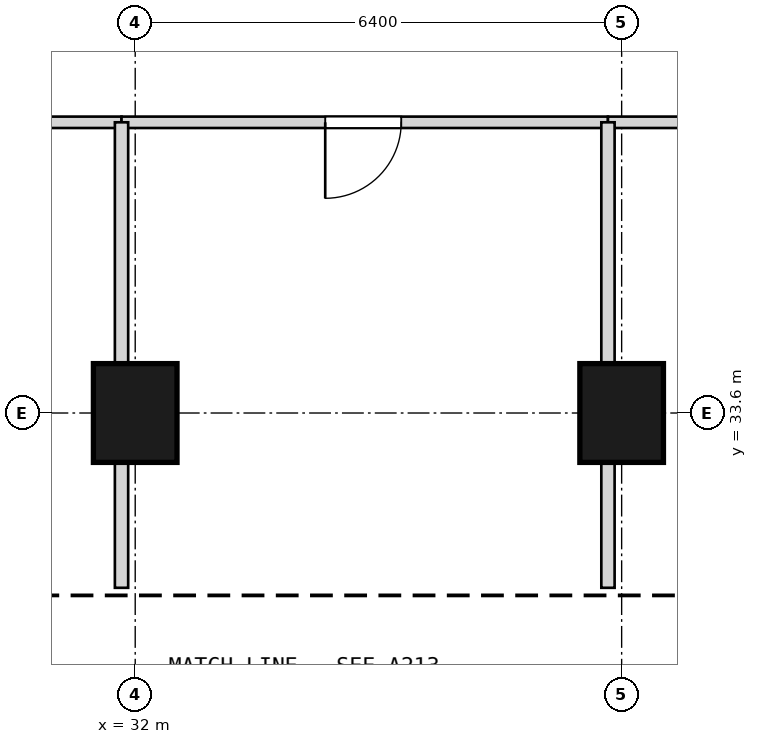
"""IFC4 building model, lengths in metres.
Left out: names, types, materials, properties, quantities, classifications, styles, units other than length and angle.
Written with IfcOpenShell. Run it as: python <this file> out.ifc"""

import sys

from ifc_helpers import new_model, si_unit, direction, frame, frame_2d, origin, origin_2d, place, context, subcontext, project, spatial, rectangle, extrude, element, fill, save


model = new_model("IFC4")
c1 = context("Model", 3, precision=1e-05, world=origin(), true_north=direction((0.0, 1.0)))
c2 = subcontext(c1, "Body", "Model", "MODEL_VIEW")
j1 = project(units=[si_unit("LENGTHUNIT", "METRE"), si_unit("PLANEANGLEUNIT", "RADIAN")], contexts=[c1])
p1 = place(None, origin())
s1 = spatial("IfcSite", under=j1, at=p1, CompositionType="ELEMENT")
p2 = place(p1, origin())
s2 = spatial("IfcBuilding", under=s1, at=p2, CompositionType="ELEMENT")
p3 = place(p2, frame((0.0, 0.0, 8.4)))
s3 = spatial("IfcBuildingStorey", under=s2, at=p3, CompositionType="ELEMENT", Elevation=8.4)
for number, where, z_axis, x_axis in (
    (1, (32.0, 33.6, 0.0), (0.0, 0.0, 1.0), (1.0, 0.0, 0.0)),
    (2, (38.4, 33.6, 0.0), (0.0, 0.0, 1.0), (1.0, 0.0, 0.0)),
):
    element("IfcColumn", number, at=place(p3, frame(where, z_axis=z_axis, x_axis=x_axis)), inside=s3, PredefinedType="COLUMN", context=c2, shape_type="SweptSolid", body=[
        extrude(rectangle(XDim=1.1, YDim=1.3, at=origin_2d()), origin(), (0.0, 0.0, 1.0), 4.5),
    ])
p4 = place(p3, frame((25.85, 37.425, 0.0), z_axis=(0.0, 0.0, 1.0), x_axis=(1.0, 0.0, 0.0)))
e3 = element("IfcWall", 3, at=p4, inside=s3, PredefinedType="PARTITIONING", context=c2, shape_type="SweptSolid", body=[
    extrude(rectangle(XDim=5.97, YDim=0.15, at=frame_2d((2.985, 0.0))), origin(), (0.0, 0.0, 1.0), 4.28),
])
p5 = place(p4, frame((2.45, 0.0, 0.0)))
e4 = element("IfcOpeningElement", 4, at=p5, cuts=e3, PredefinedType="OPENING", context=c2, shape_type="SweptSolid", body=[
    extrude(rectangle(XDim=1.0, YDim=2.1, at=frame_2d((0.5, 1.05))), frame((0.0, 0.085, 0.0), z_axis=(0.0, -1.0, 0.0), x_axis=(1.0, 0.0, 0.0)), (0.0, 0.0, 1.0), 0.17),
])
p6 = place(p3, frame((31.82, 37.425, 0.0), z_axis=(0.0, 0.0, 1.0), x_axis=(1.0, 0.0, 0.0)))
e5 = element("IfcWall", 5, at=p6, inside=s3, PredefinedType="PARTITIONING", context=c2, shape_type="SweptSolid", body=[
    extrude(rectangle(XDim=6.4, YDim=0.15, at=frame_2d((3.2, 0.0))), origin(), (0.0, 0.0, 1.0), 4.28),
])
p7 = place(p6, frame((2.68, 0.0, 0.0)))
e6 = element("IfcOpeningElement", 6, at=p7, cuts=e5, PredefinedType="OPENING", context=c2, shape_type="SweptSolid", body=[
    extrude(rectangle(XDim=1.0, YDim=2.1, at=frame_2d((0.5, 1.05))), frame((0.0, 0.085, 0.0), z_axis=(0.0, -1.0, 0.0), x_axis=(1.0, 0.0, 0.0)), (0.0, 0.0, 1.0), 0.17),
])
p8 = place(p3, frame((38.22, 37.425, 0.0), z_axis=(0.0, 0.0, 1.0), x_axis=(1.0, 0.0, 0.0)))
e7 = element("IfcWall", 7, at=p8, inside=s3, PredefinedType="PARTITIONING", context=c2, shape_type="SweptSolid", body=[
    extrude(rectangle(XDim=6.4, YDim=0.15, at=frame_2d((3.2, 0.0))), origin(), (0.0, 0.0, 1.0), 4.28),
])
p9 = place(p8, frame((2.68, 0.0, 0.0)))
e8 = element("IfcOpeningElement", 8, at=p9, cuts=e7, PredefinedType="OPENING", context=c2, shape_type="SweptSolid", body=[
    extrude(rectangle(XDim=1.0, YDim=2.1, at=frame_2d((0.5, 1.05))), frame((0.0, 0.085, 0.0), z_axis=(0.0, -1.0, 0.0), x_axis=(1.0, 0.0, 0.0)), (0.0, 0.0, 1.0), 0.17),
])
p10 = place(p3, frame((31.82, 31.3, 0.0), z_axis=(0.0, 0.0, 1.0), x_axis=(0.0, 1.0, 0.0)))
e9 = element("IfcWall", 9, at=p10, inside=s3, PredefinedType="PARTITIONING", context=c2, shape_type="SweptSolid", body=[
    extrude(rectangle(XDim=1.67, YDim=0.175, at=frame_2d((0.835, 0.0))), origin(), (0.0, 0.0, 1.0), 3.38),
])
p11 = place(p3, frame((31.82, 34.23, 0.0), z_axis=(0.0, 0.0, 1.0), x_axis=(0.0, 1.0, 0.0)))
e10 = element("IfcWall", 10, at=p11, inside=s3, PredefinedType="PARTITIONING", context=c2, shape_type="SweptSolid", body=[
    extrude(rectangle(XDim=3.195, YDim=0.175, at=frame_2d((1.598, 0.0))), origin(), (0.0, 0.0, 1.0), 3.38),
])
p12 = place(p3, frame((38.22, 31.3, 0.0), z_axis=(0.0, 0.0, 1.0), x_axis=(0.0, 1.0, 0.0)))
e11 = element("IfcWall", 11, at=p12, inside=s3, PredefinedType="PARTITIONING", context=c2, shape_type="SweptSolid", body=[
    extrude(rectangle(XDim=1.67, YDim=0.175, at=frame_2d((0.835, 0.0))), origin(), (0.0, 0.0, 1.0), 3.38),
])
p13 = place(p3, frame((38.22, 34.23, 0.0), z_axis=(0.0, 0.0, 1.0), x_axis=(0.0, 1.0, 0.0)))
e12 = element("IfcWall", 12, at=p13, inside=s3, PredefinedType="PARTITIONING", context=c2, shape_type="SweptSolid", body=[
    extrude(rectangle(XDim=3.195, YDim=0.175, at=frame_2d((1.598, 0.0))), origin(), (0.0, 0.0, 1.0), 3.38),
])
p14 = place(p7, frame((1.0, 0.0, 0.0), z_axis=(0.0, 0.0, 1.0), x_axis=(-1.0, 0.0, 0.0)))
e13 = element("IfcDoor", 13, at=p14, inside=s3, OperationType="SINGLE_SWING_RIGHT", PredefinedType="DOOR", context=c2, shape_type="SweptSolid", body=[
    extrude(rectangle(XDim=1.0, YDim=2.1, at=frame_2d((0.5, 1.05))), frame((0.0, 0.025, 0.0), z_axis=(0.0, -1.0, 0.0), x_axis=(1.0, 0.0, 0.0)), (0.0, 0.0, 1.0), 0.05),
])
fill(e6, e13)
save(model, sys.argv[1])
